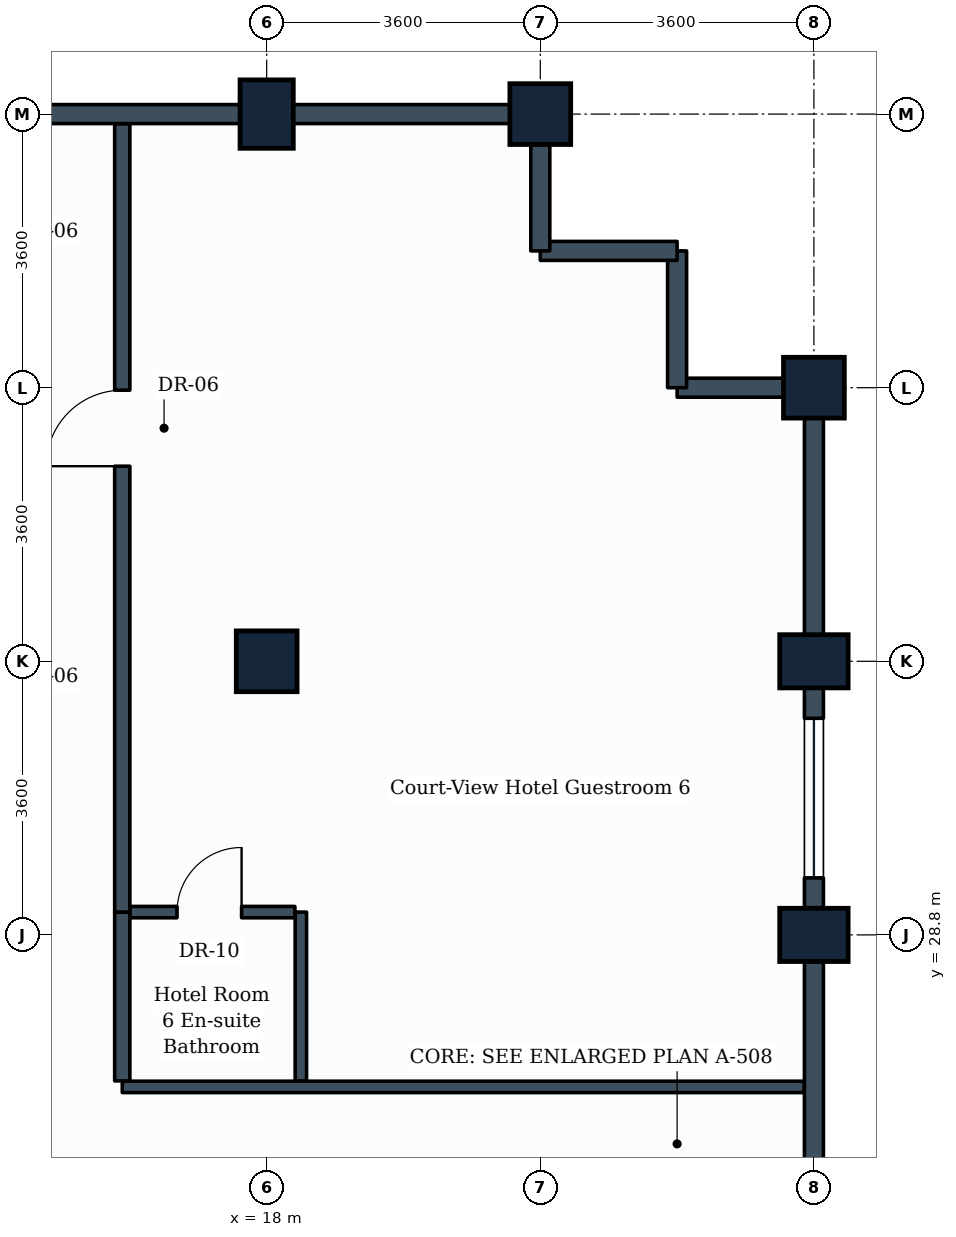
"""IFC4 building model, lengths in metres.
Left out: names, types, materials, properties, quantities, classifications, styles, units other than length and angle.
Written with IfcOpenShell. Run it as: python <this file> out.ifc"""

import sys

from ifc_helpers import new_model, si_unit, direction, frame, frame_2d, origin, origin_2d, place, context, subcontext, project, spatial, rectangle, extrude, element, fill, save


model = new_model("IFC4")
c1 = context("Model", 3, precision=1e-05, world=origin(), true_north=direction((0.0, 1.0)))
c2 = subcontext(c1, "Body", "Model", "MODEL_VIEW")
j1 = project(units=[si_unit("LENGTHUNIT", "METRE"), si_unit("PLANEANGLEUNIT", "RADIAN")], contexts=[c1])
p1 = place(None, origin())
s1 = spatial("IfcSite", under=j1, at=p1, CompositionType="ELEMENT")
p2 = place(p1, origin())
s2 = spatial("IfcBuilding", under=s1, at=p2, CompositionType="ELEMENT")
p3 = place(p2, frame((0.0, 0.0, 217.4)))
s3 = spatial("IfcBuildingStorey", under=s2, at=p3, CompositionType="ELEMENT", Elevation=217.4)
p4 = place(p3, frame((18.0, 32.4, 0.0), z_axis=(0.0, 0.0, 1.0), x_axis=(1.0, 0.0, 0.0)))
e1 = element("IfcColumn", 1, at=p4, inside=s3, PredefinedType="COLUMN", context=c2, shape_type="SweptSolid", body=[
    extrude(rectangle(XDim=0.8, YDim=0.8, at=origin_2d()), origin(), (0.0, 0.0, 1.0), 3.6),
])
p5 = place(p3, frame((18.0, 39.6, 0.0), z_axis=(0.0, 0.0, 1.0), x_axis=(1.0, 0.0, 0.0)))
e2 = element("IfcColumn", 2, at=p5, inside=s3, PredefinedType="COLUMN", context=c2, shape_type="SweptSolid", body=[
    extrude(rectangle(XDim=0.7, YDim=0.9, at=origin_2d()), origin(), (0.0, 0.0, 1.0), 3.6),
])
p6 = place(p3, frame((21.6, 39.6, 0.0), z_axis=(0.0, 0.0, 1.0), x_axis=(1.0, 0.0, 0.0)))
e3 = element("IfcColumn", 3, at=p6, inside=s3, PredefinedType="COLUMN", context=c2, shape_type="SweptSolid", body=[
    extrude(rectangle(XDim=0.8, YDim=0.8, at=origin_2d()), origin(), (0.0, 0.0, 1.0), 3.6),
])
for number, where, z_axis, x_axis in (
    (4, (25.2, 28.8, 0.0), (0.0, 0.0, 1.0), (0.0, 1.0, 0.0)),
    (5, (25.2, 32.4, 0.0), (0.0, 0.0, 1.0), (0.0, 1.0, 0.0)),
):
    element("IfcColumn", number, at=place(p3, frame(where, z_axis=z_axis, x_axis=x_axis)), inside=s3, PredefinedType="COLUMN", context=c2, shape_type="SweptSolid", body=[
        extrude(rectangle(XDim=0.7, YDim=0.9, at=origin_2d()), origin(), (0.0, 0.0, 1.0), 3.6),
    ])
p7 = place(p3, frame((25.2, 36.0, 0.0), z_axis=(0.0, 0.0, 1.0), x_axis=(0.0, 1.0, 0.0)))
e6 = element("IfcColumn", 6, at=p7, inside=s3, PredefinedType="COLUMN", context=c2, shape_type="SweptSolid", body=[
    extrude(rectangle(XDim=0.8, YDim=0.8, at=origin_2d()), origin(), (0.0, 0.0, 1.0), 3.6),
])
p8 = place(p3, frame((25.2, 25.2, 0.0), z_axis=(0.0, 0.0, 1.0), x_axis=(0.0, 1.0, 0.0)))
e7 = element("IfcWall", 7, at=p8, inside=s3, PredefinedType="STANDARD", context=c2, shape_type="SweptSolid", body=[
    extrude(rectangle(XDim=3.6, YDim=0.25, at=frame_2d((1.8, 0.0))), origin(), (0.0, 0.0, 1.0), 2.83),
])
p9 = place(p3, frame((25.2, 28.8, 0.0), z_axis=(0.0, 0.0, 1.0), x_axis=(0.0, 1.0, 0.0)))
e8 = element("IfcWall", 8, at=p9, inside=s3, PredefinedType="STANDARD", context=c2, shape_type="SweptSolid", body=[
    extrude(rectangle(XDim=3.6, YDim=0.25, at=frame_2d((1.8, 0.0))), origin(), (0.0, 0.0, 1.0), 2.83),
])
p10 = place(p9, frame((0.75, 0.0, 0.85)))
e9 = element("IfcOpeningElement", 9, at=p10, cuts=e8, PredefinedType="OPENING", context=c2, shape_type="SweptSolid", body=[
    extrude(rectangle(XDim=2.1, YDim=1.35, at=frame_2d((1.05, 0.675))), frame((0.0, 0.135, 0.0), z_axis=(0.0, -1.0, 0.0), x_axis=(1.0, 0.0, 0.0)), (0.0, 0.0, 1.0), 0.27),
])
p11 = place(p3, frame((25.2, 32.4, 0.0), z_axis=(0.0, 0.0, 1.0), x_axis=(0.0, 1.0, 0.0)))
e10 = element("IfcWall", 10, at=p11, inside=s3, PredefinedType="STANDARD", context=c2, shape_type="SweptSolid", body=[
    extrude(rectangle(XDim=3.6, YDim=0.25, at=frame_2d((1.8, 0.0))), origin(), (0.0, 0.0, 1.0), 2.23),
])
for number, where, z_axis, x_axis in (
    (11, (23.4, 36.0, 0.0), (0.0, 0.0, 1.0), (1.0, 0.0, 0.0)),
    (12, (23.4, 36.0, 0.0), (0.0, 0.0, 1.0), (0.0, 1.0, 0.0)),
):
    element("IfcWall", number, at=place(p3, frame(where, z_axis=z_axis, x_axis=x_axis)), inside=s3, PredefinedType="STANDARD", context=c2, shape_type="SweptSolid", body=[
        extrude(rectangle(XDim=1.8, YDim=0.25, at=frame_2d((0.9, 0.0))), origin(), (0.0, 0.0, 1.0), 2.23),
    ])
p12 = place(p3, frame((21.6, 37.8, 0.0), z_axis=(0.0, 0.0, 1.0), x_axis=(1.0, 0.0, 0.0)))
e13 = element("IfcWall", 13, at=p12, inside=s3, PredefinedType="STANDARD", context=c2, shape_type="SweptSolid", body=[
    extrude(rectangle(XDim=1.8, YDim=0.25, at=frame_2d((0.9, 0.0))), origin(), (0.0, 0.0, 1.0), 3.265),
])
p13 = place(p3, frame((21.6, 37.8, 0.0), z_axis=(0.0, 0.0, 1.0), x_axis=(0.0, 1.0, 0.0)))
e14 = element("IfcWall", 14, at=p13, inside=s3, PredefinedType="STANDARD", context=c2, shape_type="SweptSolid", body=[
    extrude(rectangle(XDim=1.8, YDim=0.25, at=frame_2d((0.9, 0.0))), origin(), (0.0, 0.0, 1.0), 2.23),
])
for number, where, z_axis, x_axis in (
    (15, (18.0, 39.6, 0.0), (0.0, 0.0, 1.0), (1.0, 0.0, 0.0)),
    (16, (14.4, 39.6, 0.0), (0.0, 0.0, 1.0), (1.0, 0.0, 0.0)),
):
    element("IfcWall", number, at=place(p3, frame(where, z_axis=z_axis, x_axis=x_axis)), inside=s3, PredefinedType="STANDARD", context=c2, shape_type="SweptSolid", body=[
        extrude(rectangle(XDim=3.6, YDim=0.25, at=frame_2d((1.8, 0.0))), origin(), (0.0, 0.0, 1.0), 2.23),
    ])
p14 = place(p3, frame((16.1, 26.8, 0.0), z_axis=(0.0, 0.0, 1.0), x_axis=(1.0, 0.0, 0.0)))
e17 = element("IfcWall", 17, at=p14, inside=s3, PredefinedType="PARTITIONING", context=c2, shape_type="SweptSolid", body=[
    extrude(rectangle(XDim=8.971, YDim=0.15, at=frame_2d((4.485, 0.0))), origin(), (0.0, 0.0, 1.0), 2.23),
])
p15 = place(p3, frame((16.1, 26.879, 0.0), z_axis=(0.0, 0.0, 1.0), x_axis=(0.0, 1.0, 0.0)))
e18 = element("IfcWall", 18, at=p15, inside=s3, PredefinedType="PARTITIONING", context=c2, shape_type="SweptSolid", body=[
    extrude(rectangle(XDim=2.221, YDim=0.2, at=frame_2d((1.111, 0.0))), origin(), (0.0, 0.0, 1.0), 2.95),
])
p16 = place(p3, frame((16.1, 29.1, 0.0), z_axis=(0.0, 0.0, 1.0), x_axis=(0.0, 1.0, 0.0)))
e19 = element("IfcWall", 19, at=p16, inside=s3, PredefinedType="PARTITIONING", context=c2, shape_type="SweptSolid", body=[
    extrude(rectangle(XDim=10.371, YDim=0.2, at=frame_2d((5.186, 0.0))), origin(), (0.0, 0.0, 1.0), 2.23),
])
p17 = place(p16, frame((5.867, 0.0, 0.0)))
e20 = element("IfcOpeningElement", 20, at=p17, cuts=e19, PredefinedType="OPENING", context=c2, shape_type="SweptSolid", body=[
    extrude(rectangle(XDim=1.0, YDim=2.1, at=frame_2d((0.5, 1.05))), frame((0.0, 0.11, 0.0), z_axis=(0.0, -1.0, 0.0), x_axis=(1.0, 0.0, 0.0)), (0.0, 0.0, 1.0), 0.22),
])
p18 = place(p3, frame((18.45, 26.879, 0.0), z_axis=(0.0, 0.0, 1.0), x_axis=(0.0, 1.0, 0.0)))
e21 = element("IfcWall", 21, at=p18, inside=s3, PredefinedType="PARTITIONING", context=c2, shape_type="SweptSolid", body=[
    extrude(rectangle(XDim=2.221, YDim=0.15, at=frame_2d((1.111, 0.0))), origin(), (0.0, 0.0, 1.0), 2.23),
])
p19 = place(p3, frame((16.204, 29.1, 0.0), z_axis=(0.0, 0.0, 1.0), x_axis=(1.0, 0.0, 0.0)))
e22 = element("IfcWall", 22, at=p19, inside=s3, PredefinedType="PARTITIONING", context=c2, shape_type="SweptSolid", body=[
    extrude(rectangle(XDim=2.167, YDim=0.15, at=frame_2d((1.083, 0.0))), origin(), (0.0, 0.0, 1.0), 2.23),
])
p20 = place(p19, frame((0.616, 0.0, 0.0)))
e23 = element("IfcOpeningElement", 23, at=p20, cuts=e22, PredefinedType="OPENING", context=c2, shape_type="SweptSolid", body=[
    extrude(rectangle(XDim=0.85, YDim=2.1, at=frame_2d((0.425, 1.05))), frame((0.0, 0.085, 0.0), z_axis=(0.0, -1.0, 0.0), x_axis=(1.0, 0.0, 0.0)), (0.0, 0.0, 1.0), 0.17),
])
p21 = place(p10, origin())
e24 = element("IfcWindow", 24, at=p21, inside=s3, PartitioningType="SINGLE_PANEL", PredefinedType="WINDOW", context=c2, shape_type="SweptSolid", body=[
    extrude(rectangle(XDim=2.1, YDim=1.35, at=frame_2d((1.05, 0.675))), frame((0.0, 0.03, 0.0), z_axis=(0.0, -1.0, 0.0), x_axis=(1.0, 0.0, 0.0)), (0.0, 0.0, 1.0), 0.06),
])
fill(e9, e24)
p22 = place(p17, origin())
e25 = element("IfcDoor", 25, at=p22, inside=s3, OperationType="SINGLE_SWING_LEFT", PredefinedType="DOOR", context=c2, shape_type="SweptSolid", body=[
    extrude(rectangle(XDim=1.0, YDim=2.1, at=frame_2d((0.5, 1.05))), frame((0.0, 0.025, 0.0), z_axis=(0.0, -1.0, 0.0), x_axis=(1.0, 0.0, 0.0)), (0.0, 0.0, 1.0), 0.05),
])
fill(e20, e25)
p23 = place(p20, origin())
e26 = element("IfcDoor", 26, at=p23, inside=s3, OperationType="SINGLE_SWING_RIGHT", PredefinedType="DOOR", context=c2, shape_type="SweptSolid", body=[
    extrude(rectangle(XDim=0.85, YDim=2.1, at=frame_2d((0.425, 1.05))), frame((0.0, 0.025, 0.0), z_axis=(0.0, -1.0, 0.0), x_axis=(1.0, 0.0, 0.0)), (0.0, 0.0, 1.0), 0.05),
])
fill(e23, e26)
save(model, sys.argv[1])
